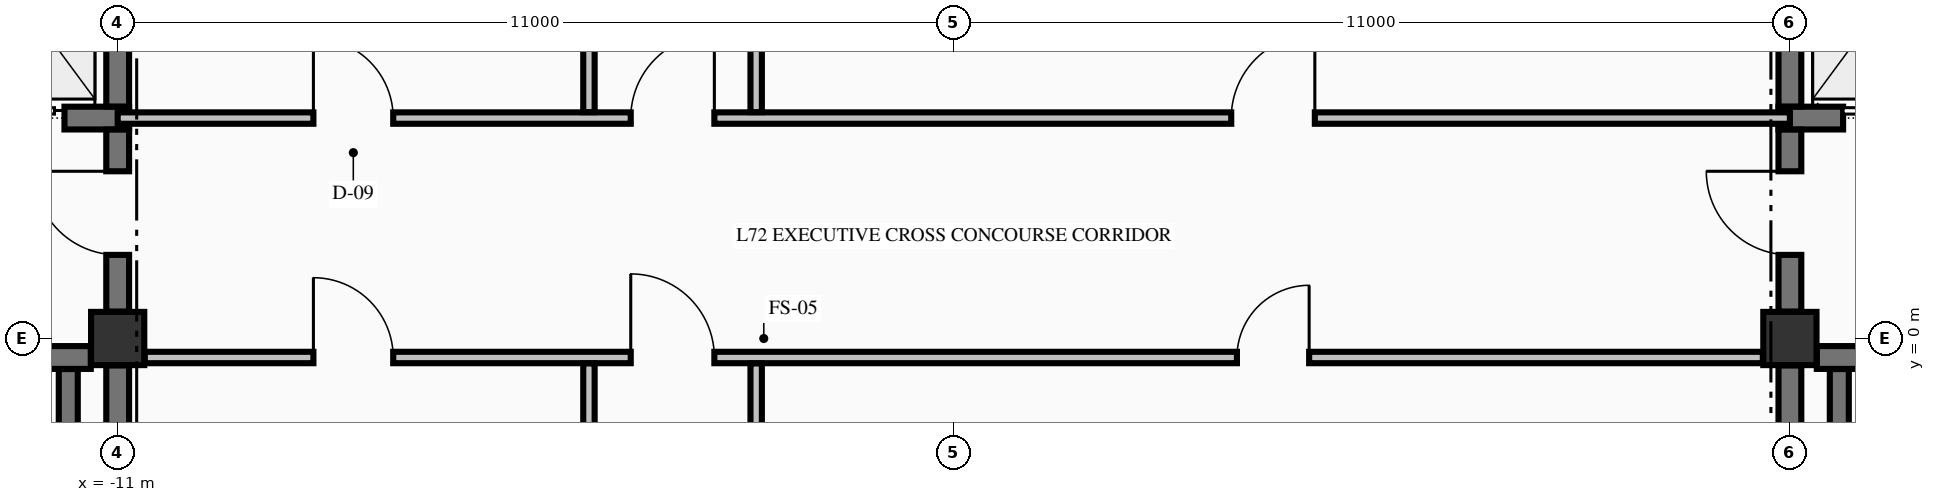
"""IFC4 building model, lengths in metres.
Left out: names, types, materials, properties, quantities, classifications, styles, units other than length and angle.
Written with IfcOpenShell. Run it as: python <this file> out.ifc"""

import sys

from ifc_helpers import new_model, si_unit, direction, frame, frame_2d, origin, origin_2d, place, context, subcontext, project, spatial, rectangle, extrude, element, fill, save


model = new_model("IFC4")
c1 = context("Model", 3, precision=1e-05, world=origin(), true_north=direction((0.0, 1.0)))
c2 = subcontext(c1, "Body", "Model", "MODEL_VIEW")
j1 = project(units=[si_unit("LENGTHUNIT", "METRE"), si_unit("PLANEANGLEUNIT", "RADIAN")], contexts=[c1])
p1 = place(None, origin())
s1 = spatial("IfcSite", under=j1, at=p1, CompositionType="ELEMENT")
p2 = place(p1, origin())
s2 = spatial("IfcBuilding", under=s1, at=p2, CompositionType="ELEMENT")
p3 = place(p2, frame((0.0, 0.0, 270.58)))
s3 = spatial("IfcBuildingStorey", under=s2, at=p3, CompositionType="ELEMENT", Elevation=270.58)
for number, where, z_axis, x_axis in (
    (1, (-11.0, 0.0, -0.325), (0.0, 0.0, 1.0), (1.0, 0.0, 0.0)),
    (2, (11.0, 0.0, -0.325), (0.0, 0.0, 1.0), (1.0, 0.0, 0.0)),
):
    element("IfcColumn", number, at=place(p3, frame(where, z_axis=z_axis, x_axis=x_axis)), inside=s3, PredefinedType="COLUMN", context=c2, shape_type="SweptSolid", body=[
        extrude(rectangle(XDim=0.7, YDim=0.7, at=origin_2d()), origin(), (0.0, 0.0, 1.0), 3.815),
    ])
p4 = place(p3, frame((-19.646, -0.25, 0.0), z_axis=(0.0, 0.0, 1.0), x_axis=(1.0, 0.0, 0.0)))
e3 = element("IfcWall", 3, at=p4, inside=s3, PredefinedType="SHEAR", context=c2, shape_type="SweptSolid", body=[
    extrude(rectangle(XDim=8.292, YDim=0.3, at=frame_2d((4.146, 0.0))), origin(), (0.0, 0.0, 1.0), 3.49),
])
p5 = place(p4, frame((5.946, 0.0, 0.0)))
e4 = element("IfcOpeningElement", 4, at=p5, cuts=e3, PredefinedType="OPENING", context=c2, shape_type="SweptSolid", body=[
    extrude(rectangle(XDim=1.1, YDim=2.15, at=frame_2d((0.55, 1.075))), frame((0.0, 0.16, 0.0), z_axis=(0.0, -1.0, 0.0), x_axis=(1.0, 0.0, 0.0)), (0.0, 0.0, 1.0), 0.32),
])
p6 = place(p3, frame((11.354, -0.25, 0.0), z_axis=(0.0, 0.0, 1.0), x_axis=(1.0, 0.0, 0.0)))
e5 = element("IfcWall", 5, at=p6, inside=s3, PredefinedType="SHEAR", context=c2, shape_type="SweptSolid", body=[
    extrude(rectangle(XDim=3.521, YDim=0.3, at=frame_2d((1.76, 0.0))), origin(), (0.0, 0.0, 1.0), 3.49),
])
p7 = place(p6, frame((1.246, 0.0, 0.0)))
e6 = element("IfcOpeningElement", 6, at=p7, cuts=e5, PredefinedType="OPENING", context=c2, shape_type="SweptSolid", body=[
    extrude(rectangle(XDim=1.1, YDim=2.15, at=frame_2d((0.55, 1.075))), frame((0.0, 0.16, 0.0), z_axis=(0.0, -1.0, 0.0), x_axis=(1.0, 0.0, 0.0)), (0.0, 0.0, 1.0), 0.32),
])
p8 = place(p3, frame((-14.875, 2.9, 0.0), z_axis=(0.0, 0.0, 1.0), x_axis=(1.0, 0.0, 0.0)))
e7 = element("IfcWall", 7, at=p8, inside=s3, PredefinedType="SHEAR", context=c2, shape_type="SweptSolid", body=[
    extrude(rectangle(XDim=4.025, YDim=0.3, at=frame_2d((2.012, 0.0))), origin(), (0.0, 0.0, 1.0), 3.49),
])
p9 = place(p8, frame((2.075, 0.0, 0.0)))
e8 = element("IfcOpeningElement", 8, at=p9, cuts=e7, PredefinedType="OPENING", context=c2, shape_type="SweptSolid", body=[
    extrude(rectangle(XDim=1.1, YDim=2.2, at=frame_2d((0.55, 1.1))), frame((0.0, 0.16, 0.0), z_axis=(0.0, -1.0, 0.0), x_axis=(1.0, 0.0, 0.0)), (0.0, 0.0, 1.0), 0.32),
])
p10 = place(p3, frame((10.85, 2.9, 0.0), z_axis=(0.0, 0.0, 1.0), x_axis=(1.0, 0.0, 0.0)))
e9 = element("IfcWall", 9, at=p10, inside=s3, PredefinedType="SHEAR", context=c2, shape_type="SweptSolid", body=[
    extrude(rectangle(XDim=4.025, YDim=0.3, at=frame_2d((2.012, 0.0))), origin(), (0.0, 0.0, 1.0), 3.49),
])
p11 = place(p10, frame((0.85, 0.0, 0.0)))
e10 = element("IfcOpeningElement", 10, at=p11, cuts=e9, PredefinedType="OPENING", context=c2, shape_type="SweptSolid", body=[
    extrude(rectangle(XDim=1.1, YDim=2.2, at=frame_2d((0.55, 1.1))), frame((0.0, 0.16, 0.0), z_axis=(0.0, -1.0, 0.0), x_axis=(1.0, 0.0, 0.0)), (0.0, 0.0, 1.0), 0.32),
])
p12 = place(p3, frame((-10.644, -0.25, 0.0), z_axis=(0.0, 0.0, 1.0), x_axis=(1.0, 0.0, 0.0)))
e11 = element("IfcWall", 11, at=p12, inside=s3, PredefinedType="PARTITIONING", context=c2, shape_type="SweptSolid", body=[
    extrude(rectangle(XDim=21.288, YDim=0.15, at=frame_2d((10.644, 0.0))), origin(), (0.0, 0.0, 1.0), 3.49),
])
p13 = place(p12, frame((6.394, 0.0, 0.0)))
e12 = element("IfcOpeningElement", 12, at=p13, cuts=e11, PredefinedType="OPENING", context=c2, shape_type="SweptSolid", body=[
    extrude(rectangle(XDim=1.1, YDim=2.15, at=frame_2d((0.55, 1.075))), frame((0.0, 0.085, 0.0), z_axis=(0.0, -1.0, 0.0), x_axis=(1.0, 0.0, 0.0)), (0.0, 0.0, 1.0), 0.17),
])
p14 = place(p12, frame((2.219, 0.0, 0.0)))
e13 = element("IfcOpeningElement", 13, at=p14, cuts=e11, PredefinedType="OPENING", context=c2, shape_type="SweptSolid", body=[
    extrude(rectangle(XDim=1.05, YDim=2.15, at=frame_2d((0.525, 1.075))), frame((0.0, 0.085, 0.0), z_axis=(0.0, -1.0, 0.0), x_axis=(1.0, 0.0, 0.0)), (0.0, 0.0, 1.0), 0.17),
])
p15 = place(p12, frame((14.369, 0.0, 0.0)))
e14 = element("IfcOpeningElement", 14, at=p15, cuts=e11, PredefinedType="OPENING", context=c2, shape_type="SweptSolid", body=[
    extrude(rectangle(XDim=0.95, YDim=2.15, at=frame_2d((0.475, 1.075))), frame((0.0, 0.085, 0.0), z_axis=(0.0, -1.0, 0.0), x_axis=(1.0, 0.0, 0.0)), (0.0, 0.0, 1.0), 0.17),
])
p16 = place(p3, frame((-11.0, 2.9, 0.0), z_axis=(0.0, 0.0, 1.0), x_axis=(1.0, 0.0, 0.0)))
e15 = element("IfcWall", 15, at=p16, inside=s3, PredefinedType="PARTITIONING", context=c2, shape_type="SweptSolid", body=[
    extrude(rectangle(XDim=22.0, YDim=0.15, at=frame_2d((11.0, 0.0))), origin(), (0.0, 0.0, 1.0), 3.49),
])
p17 = place(p16, frame((6.75, 0.0, 0.0)))
e16 = element("IfcOpeningElement", 16, at=p17, cuts=e15, PredefinedType="OPENING", context=c2, shape_type="SweptSolid", body=[
    extrude(rectangle(XDim=1.1, YDim=2.15, at=frame_2d((0.55, 1.075))), frame((0.0, 0.085, 0.0), z_axis=(0.0, -1.0, 0.0), x_axis=(1.0, 0.0, 0.0)), (0.0, 0.0, 1.0), 0.17),
])
p18 = place(p16, frame((2.575, 0.0, 0.0)))
e17 = element("IfcOpeningElement", 17, at=p18, cuts=e15, PredefinedType="OPENING", context=c2, shape_type="SweptSolid", body=[
    extrude(rectangle(XDim=1.05, YDim=2.15, at=frame_2d((0.525, 1.075))), frame((0.0, 0.085, 0.0), z_axis=(0.0, -1.0, 0.0), x_axis=(1.0, 0.0, 0.0)), (0.0, 0.0, 1.0), 0.17),
])
p19 = place(p16, frame((14.65, 0.0, 0.0)))
e18 = element("IfcOpeningElement", 18, at=p19, cuts=e15, PredefinedType="OPENING", context=c2, shape_type="SweptSolid", body=[
    extrude(rectangle(XDim=1.1, YDim=2.15, at=frame_2d((0.55, 1.075))), frame((0.0, 0.085, 0.0), z_axis=(0.0, -1.0, 0.0), x_axis=(1.0, 0.0, 0.0)), (0.0, 0.0, 1.0), 0.17),
])
p20 = place(p3, frame((-11.65, -9.798, 0.0), z_axis=(0.0, 0.0, 1.0), x_axis=(0.0, 1.0, 0.0)))
e19 = element("IfcWall", 19, at=p20, inside=s3, PredefinedType="SOLIDWALL", context=c2, shape_type="SweptSolid", body=[
    extrude(rectangle(XDim=9.396, YDim=0.25, at=frame_2d((4.698, 0.0))), origin(), (0.0, 0.0, 1.0), 3.49),
])
p21 = place(p3, frame((-11.0, -9.596, 0.0), z_axis=(0.0, 0.0, 1.0), x_axis=(0.0, 1.0, 0.0)))
e20 = element("IfcWall", 20, at=p21, inside=s3, PredefinedType="SHEAR", context=c2, shape_type="SweptSolid", body=[
    extrude(rectangle(XDim=9.242, YDim=0.3, at=frame_2d((4.621, 0.0))), origin(), (0.0, 0.0, 1.0), 3.49),
])
p22 = place(p3, frame((-11.0, 0.354, 0.0), z_axis=(0.0, 0.0, 1.0), x_axis=(0.0, 1.0, 0.0)))
e21 = element("IfcWall", 21, at=p22, inside=s3, PredefinedType="SHEAR", context=c2, shape_type="SweptSolid", body=[
    extrude(rectangle(XDim=2.394, YDim=0.3, at=frame_2d((1.197, 0.0))), origin(), (0.0, 0.0, 1.0), 3.49),
])
p23 = place(p22, frame((0.746, 0.0, 0.0)))
e22 = element("IfcOpeningElement", 22, at=p23, cuts=e21, PredefinedType="OPENING", context=c2, shape_type="SweptSolid", body=[
    extrude(rectangle(XDim=1.1, YDim=2.15, at=frame_2d((0.55, 1.075))), frame((0.0, 0.16, 0.0), z_axis=(0.0, -1.0, 0.0), x_axis=(1.0, 0.0, 0.0)), (0.0, 0.0, 1.0), 0.32),
])
p24 = place(p3, frame((-11.0, 3.052, 0.0), z_axis=(0.0, 0.0, 1.0), x_axis=(0.0, 1.0, 0.0)))
e23 = element("IfcWall", 23, at=p24, inside=s3, PredefinedType="SHEAR", context=c2, shape_type="SweptSolid", body=[
    extrude(rectangle(XDim=2.496, YDim=0.3, at=frame_2d((1.248, 0.0))), origin(), (0.0, 0.0, 1.0), 3.49),
])
p25 = place(p3, frame((11.0, -9.596, 0.0), z_axis=(0.0, 0.0, 1.0), x_axis=(0.0, 1.0, 0.0)))
e24 = element("IfcWall", 24, at=p25, inside=s3, PredefinedType="SHEAR", context=c2, shape_type="SweptSolid", body=[
    extrude(rectangle(XDim=9.242, YDim=0.3, at=frame_2d((4.621, 0.0))), origin(), (0.0, 0.0, 1.0), 3.49),
])
p26 = place(p3, frame((11.0, 0.354, 0.0), z_axis=(0.0, 0.0, 1.0), x_axis=(0.0, 1.0, 0.0)))
e25 = element("IfcWall", 25, at=p26, inside=s3, PredefinedType="SHEAR", context=c2, shape_type="SweptSolid", body=[
    extrude(rectangle(XDim=2.394, YDim=0.3, at=frame_2d((1.197, 0.0))), origin(), (0.0, 0.0, 1.0), 3.49),
])
p27 = place(p26, frame((0.746, 0.0, 0.0)))
e26 = element("IfcOpeningElement", 26, at=p27, cuts=e25, PredefinedType="OPENING", context=c2, shape_type="SweptSolid", body=[
    extrude(rectangle(XDim=1.1, YDim=2.15, at=frame_2d((0.55, 1.075))), frame((0.0, 0.16, 0.0), z_axis=(0.0, -1.0, 0.0), x_axis=(1.0, 0.0, 0.0)), (0.0, 0.0, 1.0), 0.32),
])
p28 = place(p3, frame((11.0, 3.052, 0.0), z_axis=(0.0, 0.0, 1.0), x_axis=(0.0, 1.0, 0.0)))
e27 = element("IfcWall", 27, at=p28, inside=s3, PredefinedType="SHEAR", context=c2, shape_type="SweptSolid", body=[
    extrude(rectangle(XDim=2.496, YDim=0.3, at=frame_2d((1.248, 0.0))), origin(), (0.0, 0.0, 1.0), 3.49),
])
p29 = place(p3, frame((11.65, -9.798, 0.0), z_axis=(0.0, 0.0, 1.0), x_axis=(0.0, 1.0, 0.0)))
e28 = element("IfcWall", 28, at=p29, inside=s3, PredefinedType="SOLIDWALL", context=c2, shape_type="SweptSolid", body=[
    extrude(rectangle(XDim=9.396, YDim=0.25, at=frame_2d((4.698, 0.0))), origin(), (0.0, 0.0, 1.0), 3.49),
])
p30 = place(p3, frame((-4.8, -9.872, 0.0), z_axis=(0.0, 0.0, 1.0), x_axis=(0.0, 1.0, 0.0)))
e29 = element("IfcWall", 29, at=p30, inside=s3, PredefinedType="PARTITIONING", context=c2, shape_type="SweptSolid", body=[
    extrude(rectangle(XDim=9.544, YDim=0.15, at=frame_2d((4.772, 0.0))), origin(), (0.0, 0.0, 1.0), 3.49),
])
p31 = place(p3, frame((-4.8, 2.978, 0.0), z_axis=(0.0, 0.0, 1.0), x_axis=(0.0, 1.0, 0.0)))
e30 = element("IfcWall", 30, at=p31, inside=s3, PredefinedType="PARTITIONING", context=c2, shape_type="SweptSolid", body=[
    extrude(rectangle(XDim=7.444, YDim=0.15, at=frame_2d((3.722, 0.0))), origin(), (0.0, 0.0, 1.0), 3.49),
])
p32 = place(p3, frame((-2.6, -5.247, 0.0), z_axis=(0.0, 0.0, 1.0), x_axis=(0.0, 1.0, 0.0)))
e31 = element("IfcWall", 31, at=p32, inside=s3, PredefinedType="PARTITIONING", context=c2, shape_type="SweptSolid", body=[
    extrude(rectangle(XDim=4.919, YDim=0.15, at=frame_2d((2.459, 0.0))), origin(), (0.0, 0.0, 1.0), 3.49),
])
p33 = place(p3, frame((-2.6, 2.978, 0.0), z_axis=(0.0, 0.0, 1.0), x_axis=(0.0, 1.0, 0.0)))
e32 = element("IfcWall", 32, at=p33, inside=s3, PredefinedType="PARTITIONING", context=c2, shape_type="SweptSolid", body=[
    extrude(rectangle(XDim=7.444, YDim=0.15, at=frame_2d((3.722, 0.0))), origin(), (0.0, 0.0, 1.0), 3.49),
])
p34 = place(p23, origin())
e33 = element("IfcDoor", 33, at=p34, inside=s3, OperationType="SINGLE_SWING_RIGHT", PredefinedType="DOOR", context=c2, shape_type="SweptSolid", body=[
    extrude(rectangle(XDim=1.1, YDim=2.15, at=frame_2d((0.55, 1.075))), frame((0.0, 0.025, 0.0), z_axis=(0.0, -1.0, 0.0), x_axis=(1.0, 0.0, 0.0)), (0.0, 0.0, 1.0), 0.05),
])
fill(e22, e33)
p35 = place(p9, origin())
e34 = element("IfcDoor", 34, at=p35, inside=s3, OperationType="SLIDING_TO_LEFT", PredefinedType="DOOR", context=c2, shape_type="SweptSolid", body=[
    extrude(rectangle(XDim=1.1, YDim=2.2, at=frame_2d((0.55, 1.1))), frame((0.0, 0.025, 0.0), z_axis=(0.0, -1.0, 0.0), x_axis=(1.0, 0.0, 0.0)), (0.0, 0.0, 1.0), 0.05),
])
fill(e8, e34)
p36 = place(p27, origin())
e35 = element("IfcDoor", 35, at=p36, inside=s3, OperationType="SINGLE_SWING_RIGHT", PredefinedType="DOOR", context=c2, shape_type="SweptSolid", body=[
    extrude(rectangle(XDim=1.1, YDim=2.15, at=frame_2d((0.55, 1.075))), frame((0.0, 0.025, 0.0), z_axis=(0.0, -1.0, 0.0), x_axis=(1.0, 0.0, 0.0)), (0.0, 0.0, 1.0), 0.05),
])
fill(e26, e35)
p37 = place(p11, origin())
e36 = element("IfcDoor", 36, at=p37, inside=s3, OperationType="SLIDING_TO_RIGHT", PredefinedType="DOOR", context=c2, shape_type="SweptSolid", body=[
    extrude(rectangle(XDim=1.1, YDim=2.2, at=frame_2d((0.55, 1.1))), frame((0.0, 0.025, 0.0), z_axis=(0.0, -1.0, 0.0), x_axis=(1.0, 0.0, 0.0)), (0.0, 0.0, 1.0), 0.05),
])
fill(e10, e36)
p38 = place(p17, origin())
e37 = element("IfcDoor", 37, at=p38, inside=s3, OperationType="SINGLE_SWING_RIGHT", PredefinedType="DOOR", context=c2, shape_type="SweptSolid", body=[
    extrude(rectangle(XDim=1.1, YDim=2.15, at=frame_2d((0.55, 1.075))), frame((0.0, 0.025, 0.0), z_axis=(0.0, -1.0, 0.0), x_axis=(1.0, 0.0, 0.0)), (0.0, 0.0, 1.0), 0.05),
])
fill(e16, e37)
p39 = place(p13, origin())
e38 = element("IfcDoor", 38, at=p39, inside=s3, OperationType="SINGLE_SWING_LEFT", PredefinedType="DOOR", context=c2, shape_type="SweptSolid", body=[
    extrude(rectangle(XDim=1.1, YDim=2.15, at=frame_2d((0.55, 1.075))), frame((0.0, 0.025, 0.0), z_axis=(0.0, -1.0, 0.0), x_axis=(1.0, 0.0, 0.0)), (0.0, 0.0, 1.0), 0.05),
])
fill(e12, e38)
p40 = place(p18, origin())
e39 = element("IfcDoor", 39, at=p40, inside=s3, OperationType="SINGLE_SWING_LEFT", PredefinedType="DOOR", context=c2, shape_type="SweptSolid", body=[
    extrude(rectangle(XDim=1.05, YDim=2.15, at=frame_2d((0.525, 1.075))), frame((0.0, 0.025, 0.0), z_axis=(0.0, -1.0, 0.0), x_axis=(1.0, 0.0, 0.0)), (0.0, 0.0, 1.0), 0.05),
])
fill(e17, e39)
p41 = place(p19, origin())
e40 = element("IfcDoor", 40, at=p41, inside=s3, OperationType="SINGLE_SWING_RIGHT", PredefinedType="DOOR", context=c2, shape_type="SweptSolid", body=[
    extrude(rectangle(XDim=1.1, YDim=2.15, at=frame_2d((0.55, 1.075))), frame((0.0, 0.025, 0.0), z_axis=(0.0, -1.0, 0.0), x_axis=(1.0, 0.0, 0.0)), (0.0, 0.0, 1.0), 0.05),
])
fill(e18, e40)
p42 = place(p14, origin())
e41 = element("IfcDoor", 41, at=p42, inside=s3, OperationType="SINGLE_SWING_LEFT", PredefinedType="DOOR", context=c2, shape_type="SweptSolid", body=[
    extrude(rectangle(XDim=1.05, YDim=2.15, at=frame_2d((0.525, 1.075))), frame((0.0, 0.025, 0.0), z_axis=(0.0, -1.0, 0.0), x_axis=(1.0, 0.0, 0.0)), (0.0, 0.0, 1.0), 0.05),
])
fill(e13, e41)
p43 = place(p15, origin())
e42 = element("IfcDoor", 42, at=p43, inside=s3, OperationType="SINGLE_SWING_RIGHT", PredefinedType="DOOR", context=c2, shape_type="SweptSolid", body=[
    extrude(rectangle(XDim=0.95, YDim=2.15, at=frame_2d((0.475, 1.075))), frame((0.0, 0.025, 0.0), z_axis=(0.0, -1.0, 0.0), x_axis=(1.0, 0.0, 0.0)), (0.0, 0.0, 1.0), 0.05),
])
fill(e14, e42)
save(model, sys.argv[1])
